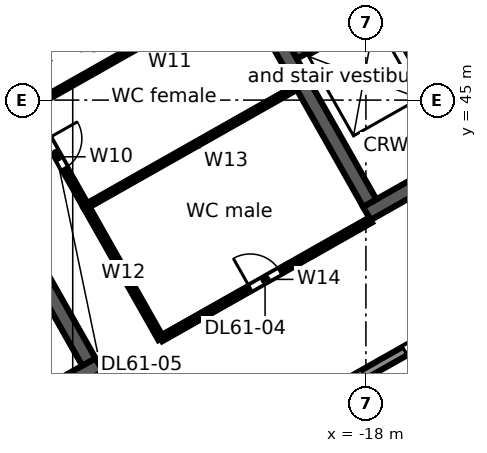
"""IFC4 building model, lengths in metres.
Left out: names, types, materials, properties, quantities, classifications, styles, units other than length and angle.
Written with IfcOpenShell. Run it as: python <this file> out.ifc"""

import sys

from ifc_helpers import new_model, si_unit, direction, frame, frame_2d, origin, place, context, subcontext, project, spatial, rectangle, extrude, element, fill, save


model = new_model("IFC4")
c1 = context("Model", 3, precision=1e-05, world=origin(), true_north=direction((0.0, 1.0)))
c2 = subcontext(c1, "Body", "Model", "MODEL_VIEW")
j1 = project(units=[si_unit("LENGTHUNIT", "METRE"), si_unit("PLANEANGLEUNIT", "RADIAN")], contexts=[c1])
p1 = place(None, origin())
s1 = spatial("IfcSite", under=j1, at=p1, CompositionType="ELEMENT")
p2 = place(p1, origin())
s2 = spatial("IfcBuilding", under=s1, at=p2, CompositionType="ELEMENT")
p3 = place(p2, frame((0.0, 0.0, 277.9)))
s3 = spatial("IfcBuildingStorey", under=s2, at=p3, CompositionType="ELEMENT", Elevation=277.9)
p4 = place(p3, frame((-58.732, 38.771, 0.0), z_axis=(0.0, 0.0, 1.0), x_axis=(0.870355615581, 0.492423702137, 0.0)))
e1 = element("IfcWall", 1, at=p4, inside=s3, PredefinedType="STANDARD", context=c2, shape_type="SweptSolid", body=[
    extrude(rectangle(XDim=64.052, YDim=0.25, at=frame_2d((32.026, 0.0))), origin(), (0.0, 0.0, 1.0), 3.52),
])
p5 = place(p4, frame((61.259, 0.0, 0.8)))
e2 = element("IfcOpeningElement", 2, at=p5, cuts=e1, PredefinedType="OPENING", context=c2, shape_type="SweptSolid", body=[
    extrude(rectangle(XDim=2.4, YDim=2.2, at=frame_2d((1.2, 1.1))), frame((0.0, 0.135, 0.0), z_axis=(0.0, -1.0, 0.0), x_axis=(1.0, 0.0, 0.0)), (0.0, 0.0, 1.0), 0.27),
])
p6 = place(p4, frame((58.216, 0.0, 0.8)))
e3 = element("IfcOpeningElement", 3, at=p6, cuts=e1, PredefinedType="OPENING", context=c2, shape_type="SweptSolid", body=[
    extrude(rectangle(XDim=2.4, YDim=2.2, at=frame_2d((1.2, 1.1))), frame((0.0, 0.135, 0.0), z_axis=(0.0, -1.0, 0.0), x_axis=(1.0, 0.0, 0.0)), (0.0, 0.0, 1.0), 0.27),
])
p7 = place(p4, frame((55.173, 0.0, 0.8)))
e4 = element("IfcOpeningElement", 4, at=p7, cuts=e1, PredefinedType="OPENING", context=c2, shape_type="SweptSolid", body=[
    extrude(rectangle(XDim=2.4, YDim=2.2, at=frame_2d((1.2, 1.1))), frame((0.0, 0.135, 0.0), z_axis=(0.0, -1.0, 0.0), x_axis=(1.0, 0.0, 0.0)), (0.0, 0.0, 1.0), 0.27),
])
p8 = place(p4, frame((52.129, 0.0, 0.8)))
e5 = element("IfcOpeningElement", 5, at=p8, cuts=e1, PredefinedType="OPENING", context=c2, shape_type="SweptSolid", body=[
    extrude(rectangle(XDim=2.4, YDim=2.2, at=frame_2d((1.2, 1.1))), frame((0.0, 0.135, 0.0), z_axis=(0.0, -1.0, 0.0), x_axis=(1.0, 0.0, 0.0)), (0.0, 0.0, 1.0), 0.27),
])
p9 = place(p4, frame((49.086, 0.0, 0.8)))
e6 = element("IfcOpeningElement", 6, at=p9, cuts=e1, PredefinedType="OPENING", context=c2, shape_type="SweptSolid", body=[
    extrude(rectangle(XDim=2.4, YDim=2.2, at=frame_2d((1.2, 1.1))), frame((0.0, 0.135, 0.0), z_axis=(0.0, -1.0, 0.0), x_axis=(1.0, 0.0, 0.0)), (0.0, 0.0, 1.0), 0.27),
])
p10 = place(p4, frame((46.043, 0.0, 0.8)))
e7 = element("IfcOpeningElement", 7, at=p10, cuts=e1, PredefinedType="OPENING", context=c2, shape_type="SweptSolid", body=[
    extrude(rectangle(XDim=2.4, YDim=2.2, at=frame_2d((1.2, 1.1))), frame((0.0, 0.135, 0.0), z_axis=(0.0, -1.0, 0.0), x_axis=(1.0, 0.0, 0.0)), (0.0, 0.0, 1.0), 0.27),
])
p11 = place(p4, frame((43.0, 0.0, 0.8)))
e8 = element("IfcOpeningElement", 8, at=p11, cuts=e1, PredefinedType="OPENING", context=c2, shape_type="SweptSolid", body=[
    extrude(rectangle(XDim=2.4, YDim=2.2, at=frame_2d((1.2, 1.1))), frame((0.0, 0.135, 0.0), z_axis=(0.0, -1.0, 0.0), x_axis=(1.0, 0.0, 0.0)), (0.0, 0.0, 1.0), 0.27),
])
p12 = place(p4, frame((39.956, 0.0, 0.8)))
e9 = element("IfcOpeningElement", 9, at=p12, cuts=e1, PredefinedType="OPENING", context=c2, shape_type="SweptSolid", body=[
    extrude(rectangle(XDim=2.4, YDim=2.2, at=frame_2d((1.2, 1.1))), frame((0.0, 0.135, 0.0), z_axis=(0.0, -1.0, 0.0), x_axis=(1.0, 0.0, 0.0)), (0.0, 0.0, 1.0), 0.27),
])
p13 = place(p4, frame((36.913, 0.0, 0.8)))
e10 = element("IfcOpeningElement", 10, at=p13, cuts=e1, PredefinedType="OPENING", context=c2, shape_type="SweptSolid", body=[
    extrude(rectangle(XDim=2.4, YDim=2.2, at=frame_2d((1.2, 1.1))), frame((0.0, 0.135, 0.0), z_axis=(0.0, -1.0, 0.0), x_axis=(1.0, 0.0, 0.0)), (0.0, 0.0, 1.0), 0.27),
])
p14 = place(p4, frame((33.87, 0.0, 0.8)))
e11 = element("IfcOpeningElement", 11, at=p14, cuts=e1, PredefinedType="OPENING", context=c2, shape_type="SweptSolid", body=[
    extrude(rectangle(XDim=2.4, YDim=2.2, at=frame_2d((1.2, 1.1))), frame((0.0, 0.135, 0.0), z_axis=(0.0, -1.0, 0.0), x_axis=(1.0, 0.0, 0.0)), (0.0, 0.0, 1.0), 0.27),
])
p15 = place(p4, frame((30.826, 0.0, 0.8)))
e12 = element("IfcOpeningElement", 12, at=p15, cuts=e1, PredefinedType="OPENING", context=c2, shape_type="SweptSolid", body=[
    extrude(rectangle(XDim=2.4, YDim=2.2, at=frame_2d((1.2, 1.1))), frame((0.0, 0.135, 0.0), z_axis=(0.0, -1.0, 0.0), x_axis=(1.0, 0.0, 0.0)), (0.0, 0.0, 1.0), 0.27),
])
p16 = place(p4, frame((27.783, 0.0, 0.8)))
e13 = element("IfcOpeningElement", 13, at=p16, cuts=e1, PredefinedType="OPENING", context=c2, shape_type="SweptSolid", body=[
    extrude(rectangle(XDim=2.4, YDim=2.2, at=frame_2d((1.2, 1.1))), frame((0.0, 0.135, 0.0), z_axis=(0.0, -1.0, 0.0), x_axis=(1.0, 0.0, 0.0)), (0.0, 0.0, 1.0), 0.27),
])
p17 = place(p4, frame((24.74, 0.0, 0.8)))
e14 = element("IfcOpeningElement", 14, at=p17, cuts=e1, PredefinedType="OPENING", context=c2, shape_type="SweptSolid", body=[
    extrude(rectangle(XDim=2.4, YDim=2.2, at=frame_2d((1.2, 1.1))), frame((0.0, 0.135, 0.0), z_axis=(0.0, -1.0, 0.0), x_axis=(1.0, 0.0, 0.0)), (0.0, 0.0, 1.0), 0.27),
])
p18 = place(p4, frame((21.696, 0.0, 0.8)))
e15 = element("IfcOpeningElement", 15, at=p18, cuts=e1, PredefinedType="OPENING", context=c2, shape_type="SweptSolid", body=[
    extrude(rectangle(XDim=2.4, YDim=2.2, at=frame_2d((1.2, 1.1))), frame((0.0, 0.135, 0.0), z_axis=(0.0, -1.0, 0.0), x_axis=(1.0, 0.0, 0.0)), (0.0, 0.0, 1.0), 0.27),
])
p19 = place(p4, frame((18.653, 0.0, 0.8)))
e16 = element("IfcOpeningElement", 16, at=p19, cuts=e1, PredefinedType="OPENING", context=c2, shape_type="SweptSolid", body=[
    extrude(rectangle(XDim=2.4, YDim=2.2, at=frame_2d((1.2, 1.1))), frame((0.0, 0.135, 0.0), z_axis=(0.0, -1.0, 0.0), x_axis=(1.0, 0.0, 0.0)), (0.0, 0.0, 1.0), 0.27),
])
p20 = place(p4, frame((15.61, 0.0, 0.8)))
e17 = element("IfcOpeningElement", 17, at=p20, cuts=e1, PredefinedType="OPENING", context=c2, shape_type="SweptSolid", body=[
    extrude(rectangle(XDim=2.4, YDim=2.2, at=frame_2d((1.2, 1.1))), frame((0.0, 0.135, 0.0), z_axis=(0.0, -1.0, 0.0), x_axis=(1.0, 0.0, 0.0)), (0.0, 0.0, 1.0), 0.27),
])
p21 = place(p4, frame((12.567, 0.0, 0.8)))
e18 = element("IfcOpeningElement", 18, at=p21, cuts=e1, PredefinedType="OPENING", context=c2, shape_type="SweptSolid", body=[
    extrude(rectangle(XDim=2.4, YDim=2.2, at=frame_2d((1.2, 1.1))), frame((0.0, 0.135, 0.0), z_axis=(0.0, -1.0, 0.0), x_axis=(1.0, 0.0, 0.0)), (0.0, 0.0, 1.0), 0.27),
])
p22 = place(p4, frame((9.523, 0.0, 0.8)))
e19 = element("IfcOpeningElement", 19, at=p22, cuts=e1, PredefinedType="OPENING", context=c2, shape_type="SweptSolid", body=[
    extrude(rectangle(XDim=2.4, YDim=2.2, at=frame_2d((1.2, 1.1))), frame((0.0, 0.135, 0.0), z_axis=(0.0, -1.0, 0.0), x_axis=(1.0, 0.0, 0.0)), (0.0, 0.0, 1.0), 0.27),
])
p23 = place(p4, frame((6.48, 0.0, 0.8)))
e20 = element("IfcOpeningElement", 20, at=p23, cuts=e1, PredefinedType="OPENING", context=c2, shape_type="SweptSolid", body=[
    extrude(rectangle(XDim=2.4, YDim=2.2, at=frame_2d((1.2, 1.1))), frame((0.0, 0.135, 0.0), z_axis=(0.0, -1.0, 0.0), x_axis=(1.0, 0.0, 0.0)), (0.0, 0.0, 1.0), 0.27),
])
p24 = place(p4, frame((3.437, 0.0, 0.8)))
e21 = element("IfcOpeningElement", 21, at=p24, cuts=e1, PredefinedType="OPENING", context=c2, shape_type="SweptSolid", body=[
    extrude(rectangle(XDim=2.4, YDim=2.2, at=frame_2d((1.2, 1.1))), frame((0.0, 0.135, 0.0), z_axis=(0.0, -1.0, 0.0), x_axis=(1.0, 0.0, 0.0)), (0.0, 0.0, 1.0), 0.27),
])
p25 = place(p4, frame((0.393, 0.0, 0.8)))
e22 = element("IfcOpeningElement", 22, at=p25, cuts=e1, PredefinedType="OPENING", context=c2, shape_type="SweptSolid", body=[
    extrude(rectangle(XDim=2.4, YDim=2.2, at=frame_2d((1.2, 1.1))), frame((0.0, 0.135, 0.0), z_axis=(0.0, -1.0, 0.0), x_axis=(1.0, 0.0, 0.0)), (0.0, 0.0, 1.0), 0.27),
])
p26 = place(p3, frame((-3.017, 46.293, 0.0), z_axis=(0.0, 0.0, 1.0), x_axis=(-0.870355474887, -0.492423950812, 0.0)))
e23 = element("IfcWall", 23, at=p26, inside=s3, PredefinedType="STANDARD", context=c2, shape_type="SweptSolid", body=[
    extrude(rectangle(XDim=40.34, YDim=0.25, at=frame_2d((20.17, 0.0))), origin(), (0.0, 0.0, 1.0), 3.52),
])
p27 = place(p26, frame((37.428, 0.0, 0.8)))
e24 = element("IfcOpeningElement", 24, at=p27, cuts=e23, PredefinedType="OPENING", context=c2, shape_type="SweptSolid", body=[
    extrude(rectangle(XDim=2.4, YDim=2.2, at=frame_2d((1.2, 1.1))), frame((0.0, 0.135, 0.0), z_axis=(0.0, -1.0, 0.0), x_axis=(1.0, 0.0, 0.0)), (0.0, 0.0, 1.0), 0.27),
])
p28 = place(p26, frame((34.372, 0.0, 0.0)))
e25 = element("IfcOpeningElement", 25, at=p28, cuts=e23, PredefinedType="OPENING", context=c2, shape_type="SweptSolid", body=[
    extrude(rectangle(XDim=1.8, YDim=2.4, at=frame_2d((0.9, 1.2))), frame((0.0, 0.135, 0.0), z_axis=(0.0, -1.0, 0.0), x_axis=(1.0, 0.0, 0.0)), (0.0, 0.0, 1.0), 0.27),
])
p29 = place(p26, frame((30.716, 0.0, 0.8)))
e26 = element("IfcOpeningElement", 26, at=p29, cuts=e23, PredefinedType="OPENING", context=c2, shape_type="SweptSolid", body=[
    extrude(rectangle(XDim=2.4, YDim=2.2, at=frame_2d((1.2, 1.1))), frame((0.0, 0.135, 0.0), z_axis=(0.0, -1.0, 0.0), x_axis=(1.0, 0.0, 0.0)), (0.0, 0.0, 1.0), 0.27),
])
p30 = place(p26, frame((27.36, 0.0, 0.8)))
e27 = element("IfcOpeningElement", 27, at=p30, cuts=e23, PredefinedType="OPENING", context=c2, shape_type="SweptSolid", body=[
    extrude(rectangle(XDim=2.4, YDim=2.2, at=frame_2d((1.2, 1.1))), frame((0.0, 0.135, 0.0), z_axis=(0.0, -1.0, 0.0), x_axis=(1.0, 0.0, 0.0)), (0.0, 0.0, 1.0), 0.27),
])
p31 = place(p26, frame((24.304, 0.0, 0.0)))
e28 = element("IfcOpeningElement", 28, at=p31, cuts=e23, PredefinedType="OPENING", context=c2, shape_type="SweptSolid", body=[
    extrude(rectangle(XDim=1.8, YDim=2.4, at=frame_2d((0.9, 1.2))), frame((0.0, 0.135, 0.0), z_axis=(0.0, -1.0, 0.0), x_axis=(1.0, 0.0, 0.0)), (0.0, 0.0, 1.0), 0.27),
])
p32 = place(p26, frame((20.648, 0.0, 0.8)))
e29 = element("IfcOpeningElement", 29, at=p32, cuts=e23, PredefinedType="OPENING", context=c2, shape_type="SweptSolid", body=[
    extrude(rectangle(XDim=2.4, YDim=2.2, at=frame_2d((1.2, 1.1))), frame((0.0, 0.135, 0.0), z_axis=(0.0, -1.0, 0.0), x_axis=(1.0, 0.0, 0.0)), (0.0, 0.0, 1.0), 0.27),
])
p33 = place(p26, frame((17.292, 0.0, 0.8)))
e30 = element("IfcOpeningElement", 30, at=p33, cuts=e23, PredefinedType="OPENING", context=c2, shape_type="SweptSolid", body=[
    extrude(rectangle(XDim=2.4, YDim=2.2, at=frame_2d((1.2, 1.1))), frame((0.0, 0.135, 0.0), z_axis=(0.0, -1.0, 0.0), x_axis=(1.0, 0.0, 0.0)), (0.0, 0.0, 1.0), 0.27),
])
p34 = place(p26, frame((14.236, 0.0, 0.0)))
e31 = element("IfcOpeningElement", 31, at=p34, cuts=e23, PredefinedType="OPENING", context=c2, shape_type="SweptSolid", body=[
    extrude(rectangle(XDim=1.8, YDim=2.4, at=frame_2d((0.9, 1.2))), frame((0.0, 0.135, 0.0), z_axis=(0.0, -1.0, 0.0), x_axis=(1.0, 0.0, 0.0)), (0.0, 0.0, 1.0), 0.27),
])
p35 = place(p26, frame((10.58, 0.0, 0.8)))
e32 = element("IfcOpeningElement", 32, at=p35, cuts=e23, PredefinedType="OPENING", context=c2, shape_type="SweptSolid", body=[
    extrude(rectangle(XDim=2.4, YDim=2.2, at=frame_2d((1.2, 1.1))), frame((0.0, 0.135, 0.0), z_axis=(0.0, -1.0, 0.0), x_axis=(1.0, 0.0, 0.0)), (0.0, 0.0, 1.0), 0.27),
])
p36 = place(p26, frame((7.224, 0.0, 0.8)))
e33 = element("IfcOpeningElement", 33, at=p36, cuts=e23, PredefinedType="OPENING", context=c2, shape_type="SweptSolid", body=[
    extrude(rectangle(XDim=2.4, YDim=2.2, at=frame_2d((1.2, 1.1))), frame((0.0, 0.135, 0.0), z_axis=(0.0, -1.0, 0.0), x_axis=(1.0, 0.0, 0.0)), (0.0, 0.0, 1.0), 0.27),
])
p37 = place(p26, frame((4.168, 0.0, 0.0)))
e34 = element("IfcOpeningElement", 34, at=p37, cuts=e23, PredefinedType="OPENING", context=c2, shape_type="SweptSolid", body=[
    extrude(rectangle(XDim=1.8, YDim=2.4, at=frame_2d((0.9, 1.2))), frame((0.0, 0.135, 0.0), z_axis=(0.0, -1.0, 0.0), x_axis=(1.0, 0.0, 0.0)), (0.0, 0.0, 1.0), 0.27),
])
p38 = place(p26, frame((0.512, 0.0, 0.8)))
e35 = element("IfcOpeningElement", 35, at=p38, cuts=e23, PredefinedType="OPENING", context=c2, shape_type="SweptSolid", body=[
    extrude(rectangle(XDim=2.4, YDim=2.2, at=frame_2d((1.2, 1.1))), frame((0.0, 0.135, 0.0), z_axis=(0.0, -1.0, 0.0), x_axis=(1.0, 0.0, 0.0)), (0.0, 0.0, 1.0), 0.27),
])
p39 = place(p3, frame((-39.813, 29.662, 0.0), z_axis=(0.0, 0.0, 1.0), x_axis=(0.870350116061, 0.492433422375, 0.0)))
e36 = element("IfcWall", 36, at=p39, inside=s3, PredefinedType="SOLIDWALL", context=c2, shape_type="SweptSolid", body=[
    extrude(rectangle(XDim=17.0, YDim=0.4, at=frame_2d((8.5, 0.0))), origin(), (0.0, 0.0, 1.0), 3.52),
])
p40 = place(p39, frame((7.2, 0.0, 0.0)))
e37 = element("IfcOpeningElement", 37, at=p40, cuts=e36, PredefinedType="OPENING", context=c2, shape_type="SweptSolid", body=[
    extrude(rectangle(XDim=1.2, YDim=2.1, at=frame_2d((0.6, 1.05))), frame((0.0, 0.21, 0.0), z_axis=(0.0, -1.0, 0.0), x_axis=(1.0, 0.0, 0.0)), (0.0, 0.0, 1.0), 0.42),
])
p41 = place(p3, frame((-31.79, 49.597, 0.0), z_axis=(0.0, 0.0, 1.0), x_axis=(0.492421663121, -0.870356769198, 0.0)))
e38 = element("IfcWall", 38, at=p41, inside=s3, PredefinedType="SOLIDWALL", context=c2, shape_type="SweptSolid", body=[
    extrude(rectangle(XDim=13.2, YDim=0.4, at=frame_2d((6.6, 0.0))), origin(), (0.0, 0.0, 1.0), 3.52),
])
p42 = place(p3, frame((-17.975, 42.017, 0.0), z_axis=(0.0, 0.0, 1.0), x_axis=(0.87034965173, 0.492434243055, 0.0)))
e39 = element("IfcWall", 39, at=p42, inside=s3, PredefinedType="SOLIDWALL", context=c2, shape_type="SweptSolid", body=[
    extrude(rectangle(XDim=15.0, YDim=0.4, at=frame_2d((7.5, 0.0))), origin(), (0.0, 0.0, 1.0), 3.52),
])
p43 = place(p42, frame((6.1, 0.0, 0.0)))
e40 = element("IfcOpeningElement", 40, at=p43, cuts=e39, PredefinedType="OPENING", context=c2, shape_type="SweptSolid", body=[
    extrude(rectangle(XDim=1.2, YDim=2.1, at=frame_2d((0.6, 1.05))), frame((0.0, 0.21, 0.0), z_axis=(0.0, -1.0, 0.0), x_axis=(1.0, 0.0, 0.0)), (0.0, 0.0, 1.0), 0.42),
])
p44 = place(p3, frame((-19.892, 46.218, 0.0), z_axis=(0.0, 0.0, 1.0), x_axis=(0.870341639186, 0.492448404505, 0.0)))
e41 = element("IfcWall", 41, at=p44, inside=s3, PredefinedType="SOLIDWALL", context=c2, shape_type="SweptSolid", body=[
    extrude(rectangle(XDim=5.1, YDim=0.3, at=frame_2d((2.55, 0.0))), origin(), (0.0, 0.0, 1.0), 3.52),
])
p45 = place(p44, frame((0.75, 0.0, 0.0)))
e42 = element("IfcOpeningElement", 42, at=p45, cuts=e41, PredefinedType="OPENING", context=c2, shape_type="SweptSolid", body=[
    extrude(rectangle(XDim=1.1, YDim=2.1, at=frame_2d((0.55, 1.05))), frame((0.0, 0.16, 0.0), z_axis=(0.0, -1.0, 0.0), x_axis=(1.0, 0.0, 0.0)), (0.0, 0.0, 1.0), 0.32),
])
p46 = place(p44, frame((3.35, 0.0, 0.0)))
e43 = element("IfcOpeningElement", 43, at=p46, cuts=e41, PredefinedType="OPENING", context=c2, shape_type="SweptSolid", body=[
    extrude(rectangle(XDim=1.1, YDim=2.1, at=frame_2d((0.55, 1.05))), frame((0.0, 0.16, 0.0), z_axis=(0.0, -1.0, 0.0), x_axis=(1.0, 0.0, 0.0)), (0.0, 0.0, 1.0), 0.32),
])
p47 = place(p3, frame((-24.4, 53.779, 0.0), z_axis=(0.0, 0.0, 1.0), x_axis=(0.492421663121, -0.870356769198, 0.0)))
e44 = element("IfcWall", 44, at=p47, inside=s3, PredefinedType="SOLIDWALL", context=c2, shape_type="SweptSolid", body=[
    extrude(rectangle(XDim=13.2, YDim=0.4, at=frame_2d((6.6, 0.0))), origin(), (0.0, 0.0, 1.0), 3.52),
])
p48 = place(p3, frame((-17.469, 47.417, 0.0), z_axis=(0.0, 0.0, 1.0), x_axis=(0.492466057713, -0.870331650579, 0.0)))
e45 = element("IfcWall", 45, at=p48, inside=s3, PredefinedType="SOLIDWALL", context=c2, shape_type="SweptSolid", body=[
    extrude(rectangle(XDim=4.25, YDim=0.2, at=frame_2d((2.125, 0.0))), origin(), (0.0, 0.0, 1.0), 3.52),
])
p49 = place(p3, frame((-26.842, 44.813, 0.0), z_axis=(0.0, 0.0, 1.0), x_axis=(0.492365617434, -0.870388475779, 0.0)))
e46 = element("IfcWall", 46, at=p49, inside=s3, PredefinedType="PARTITIONING", context=c2, shape_type="SweptSolid", body=[
    extrude(rectangle(XDim=3.0, YDim=0.15, at=frame_2d((1.5, 0.0))), origin(), (0.0, 0.0, 1.0), 2.792),
])
p50 = place(p49, frame((0.95, 0.0, 0.0)))
e47 = element("IfcOpeningElement", 47, at=p50, cuts=e46, PredefinedType="OPENING", context=c2, shape_type="SweptSolid", body=[
    extrude(rectangle(XDim=0.9, YDim=2.1, at=frame_2d((0.45, 1.05))), frame((0.0, 0.085, 0.0), z_axis=(0.0, -1.0, 0.0), x_axis=(1.0, 0.0, 0.0)), (0.0, 0.0, 1.0), 0.17),
])
p51 = place(p3, frame((-26.842, 44.813, 0.0), z_axis=(0.0, 0.0, 1.0), x_axis=(0.870283015025, 0.492552001071, 0.0)))
e48 = element("IfcWall", 48, at=p51, inside=s3, PredefinedType="PARTITIONING", context=c2, shape_type="SweptSolid", body=[
    extrude(rectangle(XDim=6.341, YDim=0.125, at=frame_2d((3.17, 0.0))), origin(), (0.0, 0.0, 1.0), 2.792),
])
p52 = place(p3, frame((-25.365, 42.202, 0.0), z_axis=(0.0, 0.0, 1.0), x_axis=(0.492525823506, -0.870297830159, 0.0)))
e49 = element("IfcWall", 49, at=p52, inside=s3, PredefinedType="PARTITIONING", context=c2, shape_type="SweptSolid", body=[
    extrude(rectangle(XDim=4.0, YDim=0.15, at=frame_2d((2.0, 0.0))), origin(), (0.0, 0.0, 1.0), 3.52),
])
p53 = place(p3, frame((-25.365, 42.202, 0.0), z_axis=(0.0, 0.0, 1.0), x_axis=(0.870320373616, 0.492485986875, 0.0)))
e50 = element("IfcWall", 50, at=p53, inside=s3, PredefinedType="PARTITIONING", context=c2, shape_type="SweptSolid", body=[
    extrude(rectangle(XDim=6.341, YDim=0.125, at=frame_2d((3.171, 0.0))), origin(), (0.0, 0.0, 1.0), 3.52),
])
p54 = place(p3, frame((-23.395, 38.721, 0.0), z_axis=(0.0, 0.0, 1.0), x_axis=(0.870349033841, 0.492435335137, 0.0)))
e51 = element("IfcWall", 51, at=p54, inside=s3, PredefinedType="PARTITIONING", context=c2, shape_type="SweptSolid", body=[
    extrude(rectangle(XDim=6.34, YDim=0.15, at=frame_2d((3.17, 0.0))), origin(), (0.0, 0.0, 1.0), 3.52),
])
p55 = place(p54, frame((2.7, 0.0, 0.0)))
e52 = element("IfcOpeningElement", 52, at=p55, cuts=e51, PredefinedType="OPENING", context=c2, shape_type="SweptSolid", body=[
    extrude(rectangle(XDim=0.9, YDim=2.1, at=frame_2d((0.45, 1.05))), frame((0.0, 0.085, 0.0), z_axis=(0.0, -1.0, 0.0), x_axis=(1.0, 0.0, 0.0)), (0.0, 0.0, 1.0), 0.17),
])
p56 = place(p34, origin())
e53 = element("IfcDoor", 53, at=p56, inside=s3, OperationType="DOUBLE_DOOR_SINGLE_SWING", PredefinedType="DOOR", context=c2, shape_type="SweptSolid", body=[
    extrude(rectangle(XDim=1.8, YDim=2.4, at=frame_2d((0.9, 1.2))), frame((0.0, 0.025, 0.0), z_axis=(0.0, -1.0, 0.0), x_axis=(1.0, 0.0, 0.0)), (0.0, 0.0, 1.0), 0.05),
])
fill(e31, e53)
p57 = place(p55, origin())
e54 = element("IfcDoor", 54, at=p57, inside=s3, OperationType="SINGLE_SWING_LEFT", PredefinedType="DOOR", context=c2, shape_type="SweptSolid", body=[
    extrude(rectangle(XDim=0.9, YDim=2.1, at=frame_2d((0.45, 1.05))), frame((0.0, 0.025, 0.0), z_axis=(0.0, -1.0, 0.0), x_axis=(1.0, 0.0, 0.0)), (0.0, 0.0, 1.0), 0.05),
])
fill(e52, e54)
p58 = place(p50, origin())
e55 = element("IfcDoor", 55, at=p58, inside=s3, OperationType="SINGLE_SWING_LEFT", PredefinedType="DOOR", context=c2, shape_type="SweptSolid", body=[
    extrude(rectangle(XDim=0.9, YDim=2.1, at=frame_2d((0.45, 1.05))), frame((0.0, 0.025, 0.0), z_axis=(0.0, -1.0, 0.0), x_axis=(1.0, 0.0, 0.0)), (0.0, 0.0, 1.0), 0.05),
])
fill(e47, e55)
save(model, sys.argv[1])
